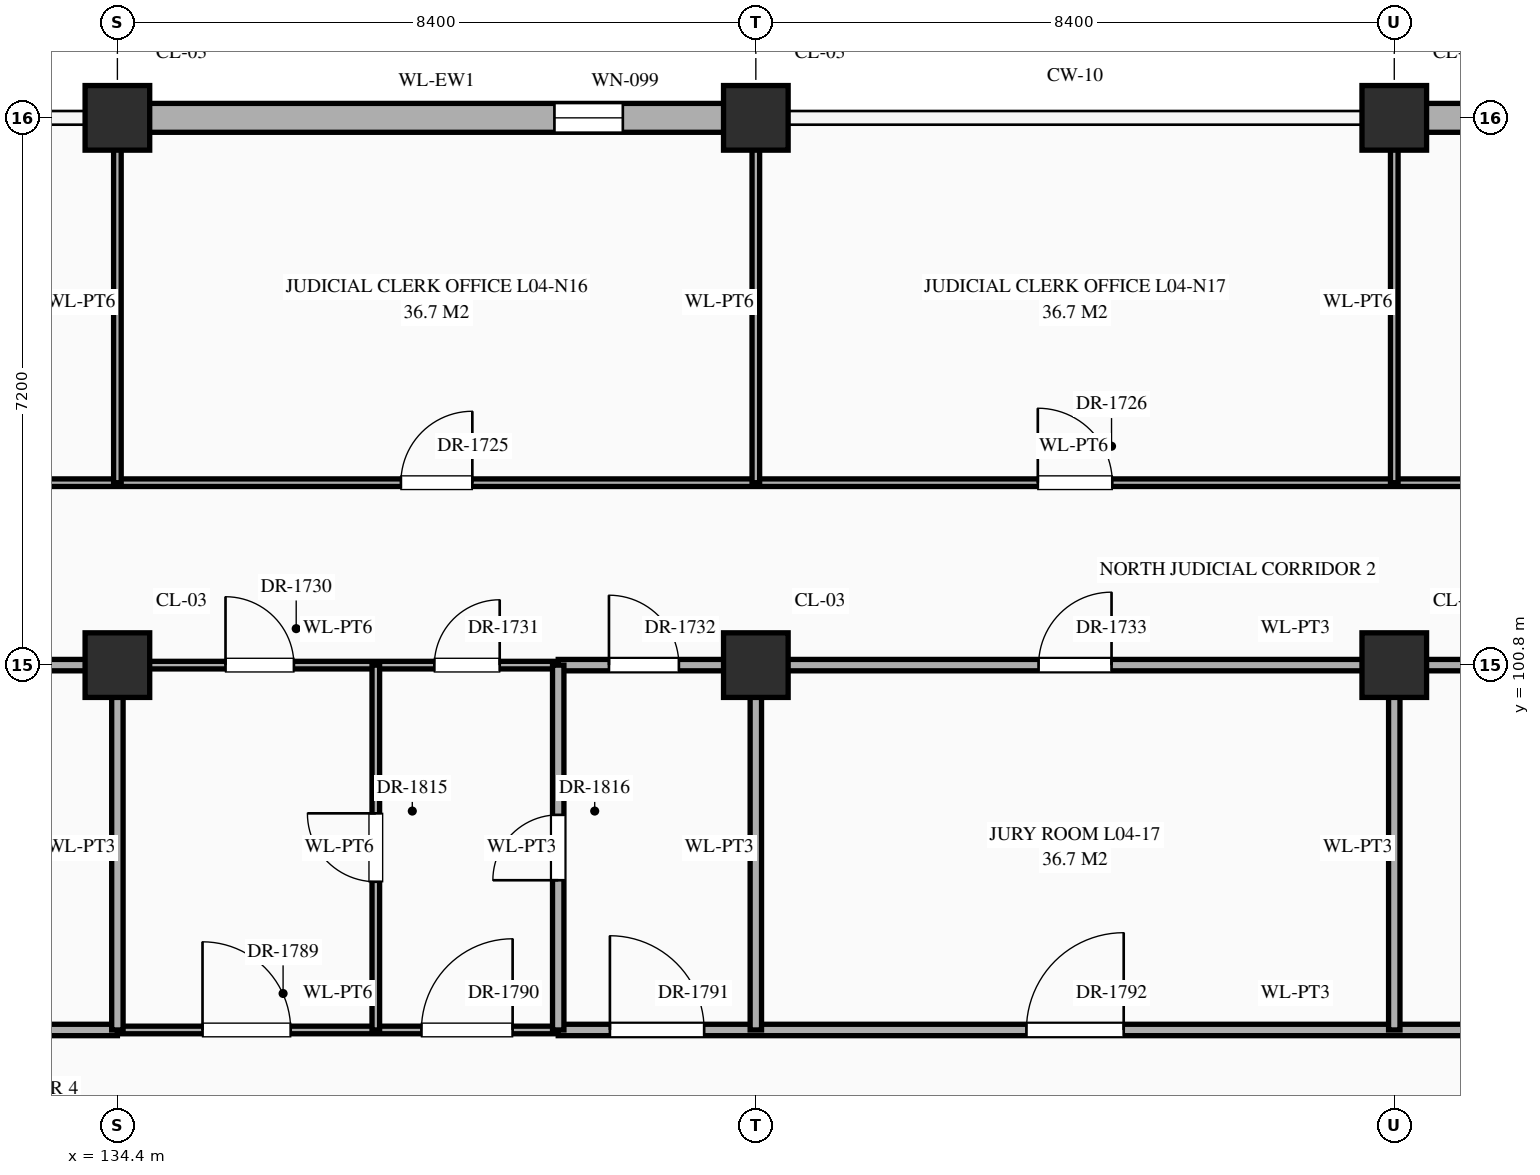
"""IFC4 building model, lengths in metres.
Left out: names, types, materials, properties, quantities, classifications, styles, units other than length and angle.
Written with IfcOpenShell. Run it as: python <this file> out.ifc"""

import sys

from ifc_helpers import new_model, si_unit, direction, frame, frame_2d, origin, origin_2d, place, context, subcontext, project, spatial, rectangle, extrude, element, fill, save


model = new_model("IFC4")
c1 = context("Model", 3, precision=1e-05, world=origin(), true_north=direction((0.0, 1.0)))
c2 = subcontext(c1, "Body", "Model", "MODEL_VIEW")
j1 = project(units=[si_unit("LENGTHUNIT", "METRE"), si_unit("PLANEANGLEUNIT", "RADIAN")], contexts=[c1])
p1 = place(None, origin())
s1 = spatial("IfcSite", under=j1, at=p1, CompositionType="ELEMENT")
p2 = place(p1, origin())
s2 = spatial("IfcBuilding", under=s1, at=p2, CompositionType="ELEMENT")
p3 = place(p2, frame((0.0, 0.0, 16.2)))
s3 = spatial("IfcBuildingStorey", under=s2, at=p3, CompositionType="ELEMENT", Elevation=16.2)
for number, where, z_axis, x_axis in (
    (1, (134.4, 100.8, 0.0), (0.0, 0.0, 1.0), (1.0, 0.0, 0.0)),
    (2, (134.4, 108.0, 0.0), (0.0, 0.0, 1.0), (1.0, 0.0, 0.0)),
    (3, (142.8, 100.8, 0.0), (0.0, 0.0, 1.0), (1.0, 0.0, 0.0)),
    (4, (142.8, 108.0, 0.0), (0.0, 0.0, 1.0), (1.0, 0.0, 0.0)),
    (5, (151.2, 100.8, 0.0), (0.0, 0.0, 1.0), (1.0, 0.0, 0.0)),
    (6, (151.2, 108.0, 0.0), (0.0, 0.0, 1.0), (1.0, 0.0, 0.0)),
):
    element("IfcColumn", number, at=place(p3, frame(where, z_axis=z_axis, x_axis=x_axis)), inside=s3, PredefinedType="COLUMN", context=c2, shape_type="SweptSolid", body=[
        extrude(rectangle(XDim=0.85, YDim=0.85, at=origin_2d()), origin(), (0.0, 0.0, 1.0), 5.4),
    ])
p4 = place(p3, frame((134.82, 108.0, 0.0), z_axis=(0.0, 0.0, 1.0), x_axis=(1.0, 0.0, 0.0)))
e7 = element("IfcWall", 7, at=p4, inside=s3, PredefinedType="STANDARD", context=c2, shape_type="SweptSolid", body=[
    extrude(rectangle(XDim=7.56, YDim=0.38, at=frame_2d((3.78, 0.0))), origin(), (0.0, 0.0, 1.0), 4.47),
])
p5 = place(p4, frame((5.33, 0.0, 0.85)))
e8 = element("IfcOpeningElement", 8, at=p5, cuts=e7, PredefinedType="OPENING", context=c2, shape_type="SweptSolid", body=[
    extrude(rectangle(XDim=0.9, YDim=1.2, at=frame_2d((0.45, 0.6))), frame((0.0, 0.202, 0.0), z_axis=(0.0, -1.0, 0.0), x_axis=(1.0, 0.0, 0.0)), (0.0, 0.0, 1.0), 0.404),
])
p6 = place(p3, frame((151.62, 108.0, 0.0), z_axis=(0.0, 0.0, 1.0), x_axis=(1.0, 0.0, 0.0)))
e9 = element("IfcWall", 9, at=p6, inside=s3, PredefinedType="STANDARD", context=c2, shape_type="SweptSolid", body=[
    extrude(rectangle(XDim=7.56, YDim=0.38, at=frame_2d((3.78, 0.0))), origin(), (0.0, 0.0, 1.0), 4.55),
])
p7 = place(p6, frame((5.33, 0.0, 0.85)))
e10 = element("IfcOpeningElement", 10, at=p7, cuts=e9, PredefinedType="OPENING", context=c2, shape_type="SweptSolid", body=[
    extrude(rectangle(XDim=0.9, YDim=1.56, at=frame_2d((0.45, 0.78))), frame((0.0, 0.202, 0.0), z_axis=(0.0, -1.0, 0.0), x_axis=(1.0, 0.0, 0.0)), (0.0, 0.0, 1.0), 0.404),
])
p8 = place(p3, frame((115.0, 96.0, 0.0), z_axis=(0.0, 0.0, 1.0), x_axis=(1.0, 0.0, 0.0)))
e11 = element("IfcWall", 11, at=p8, inside=s3, PredefinedType="STANDARD", context=c2, shape_type="SweptSolid", body=[
    extrude(rectangle(XDim=19.4, YDim=0.15, at=frame_2d((9.7, 0.0))), origin(), (0.0, 0.0, 1.0), 5.12),
])
p9 = place(p8, frame((0.73, 0.0, 0.0)))
e12 = element("IfcOpeningElement", 12, at=p9, cuts=e11, PredefinedType="OPENING", context=c2, shape_type="SweptSolid", body=[
    extrude(rectangle(XDim=1.14, YDim=2.4, at=frame_2d((0.57, 1.2))), frame((0.0, 0.087, 0.0), z_axis=(0.0, -1.0, 0.0), x_axis=(1.0, 0.0, 0.0)), (0.0, 0.0, 1.0), 0.174),
])
p10 = place(p8, frame((6.26, 0.0, 0.0)))
e13 = element("IfcOpeningElement", 13, at=p10, cuts=e11, PredefinedType="OPENING", context=c2, shape_type="SweptSolid", body=[
    extrude(rectangle(XDim=1.08, YDim=2.25, at=frame_2d((0.54, 1.125))), frame((0.0, 0.087, 0.0), z_axis=(0.0, -1.0, 0.0), x_axis=(1.0, 0.0, 0.0)), (0.0, 0.0, 1.0), 0.174),
])
p11 = place(p8, frame((14.64, 0.0, 0.0)))
e14 = element("IfcOpeningElement", 14, at=p11, cuts=e11, PredefinedType="OPENING", context=c2, shape_type="SweptSolid", body=[
    extrude(rectangle(XDim=1.12, YDim=2.25, at=frame_2d((0.56, 1.125))), frame((0.0, 0.087, 0.0), z_axis=(0.0, -1.0, 0.0), x_axis=(1.0, 0.0, 0.0)), (0.0, 0.0, 1.0), 0.174),
])
p12 = place(p3, frame((134.4, 96.0, 0.0), z_axis=(0.0, 0.0, 1.0), x_axis=(1.0, 0.0, 0.0)))
e15 = element("IfcWall", 15, at=p12, inside=s3, PredefinedType="STANDARD", context=c2, shape_type="SweptSolid", body=[
    extrude(rectangle(XDim=5.8, YDim=0.1, at=frame_2d((2.9, 0.0))), origin(), (0.0, 0.0, 1.0), 5.12),
])
p13 = place(p12, frame((1.12, 0.0, 0.0)))
e16 = element("IfcOpeningElement", 16, at=p13, cuts=e15, PredefinedType="OPENING", context=c2, shape_type="SweptSolid", body=[
    extrude(rectangle(XDim=1.16, YDim=2.3, at=frame_2d((0.58, 1.15))), frame((0.0, 0.062, 0.0), z_axis=(0.0, -1.0, 0.0), x_axis=(1.0, 0.0, 0.0)), (0.0, 0.0, 1.0), 0.124),
])
p14 = place(p12, frame((4.0, 0.0, 0.0)))
e17 = element("IfcOpeningElement", 17, at=p14, cuts=e15, PredefinedType="OPENING", context=c2, shape_type="SweptSolid", body=[
    extrude(rectangle(XDim=1.2, YDim=2.35, at=frame_2d((0.6, 1.175))), frame((0.0, 0.062, 0.0), z_axis=(0.0, -1.0, 0.0), x_axis=(1.0, 0.0, 0.0)), (0.0, 0.0, 1.0), 0.124),
])
p15 = place(p3, frame((140.2, 96.0, 0.0), z_axis=(0.0, 0.0, 1.0), x_axis=(1.0, 0.0, 0.0)))
e18 = element("IfcWall", 18, at=p15, inside=s3, PredefinedType="STANDARD", context=c2, shape_type="SweptSolid", body=[
    extrude(rectangle(XDim=19.4, YDim=0.15, at=frame_2d((9.7, 0.0))), origin(), (0.0, 0.0, 1.0), 5.05),
])
p16 = place(p15, frame((0.68, 0.0, 0.0)))
e19 = element("IfcOpeningElement", 19, at=p16, cuts=e18, PredefinedType="OPENING", context=c2, shape_type="SweptSolid", body=[
    extrude(rectangle(XDim=1.24, YDim=2.3, at=frame_2d((0.62, 1.15))), frame((0.0, 0.087, 0.0), z_axis=(0.0, -1.0, 0.0), x_axis=(1.0, 0.0, 0.0)), (0.0, 0.0, 1.0), 0.174),
])
p17 = place(p15, frame((6.16, 0.0, 0.0)))
e20 = element("IfcOpeningElement", 20, at=p17, cuts=e18, PredefinedType="OPENING", context=c2, shape_type="SweptSolid", body=[
    extrude(rectangle(XDim=1.28, YDim=2.35, at=frame_2d((0.64, 1.175))), frame((0.0, 0.087, 0.0), z_axis=(0.0, -1.0, 0.0), x_axis=(1.0, 0.0, 0.0)), (0.0, 0.0, 1.0), 0.174),
])
p18 = place(p15, frame((14.73, 0.0, 0.0)))
e21 = element("IfcOpeningElement", 21, at=p18, cuts=e18, PredefinedType="OPENING", context=c2, shape_type="SweptSolid", body=[
    extrude(rectangle(XDim=0.94, YDim=2.3, at=frame_2d((0.47, 1.15))), frame((0.0, 0.087, 0.0), z_axis=(0.0, -1.0, 0.0), x_axis=(1.0, 0.0, 0.0)), (0.0, 0.0, 1.0), 0.174),
])
p19 = place(p3, frame((126.0, 100.8, 0.0), z_axis=(0.0, 0.0, 1.0), x_axis=(1.0, 0.0, 0.0)))
e22 = element("IfcWall", 22, at=p19, inside=s3, PredefinedType="STANDARD", context=c2, shape_type="SweptSolid", body=[
    extrude(rectangle(XDim=8.4, YDim=0.15, at=frame_2d((4.2, 0.0))), origin(), (0.0, 0.0, 1.0), 4.27),
])
p20 = place(p19, frame((3.63, 0.0, 0.0)))
e23 = element("IfcOpeningElement", 23, at=p20, cuts=e22, PredefinedType="OPENING", context=c2, shape_type="SweptSolid", body=[
    extrude(rectangle(XDim=1.14, YDim=2.4, at=frame_2d((0.57, 1.2))), frame((0.0, 0.087, 0.0), z_axis=(0.0, -1.0, 0.0), x_axis=(1.0, 0.0, 0.0)), (0.0, 0.0, 1.0), 0.174),
])
p21 = place(p3, frame((134.4, 100.8, 0.0), z_axis=(0.0, 0.0, 1.0), x_axis=(1.0, 0.0, 0.0)))
e24 = element("IfcWall", 24, at=p21, inside=s3, PredefinedType="STANDARD", context=c2, shape_type="SweptSolid", body=[
    extrude(rectangle(XDim=5.8, YDim=0.1, at=frame_2d((2.9, 0.0))), origin(), (0.0, 0.0, 1.0), 4.27),
])
p22 = place(p21, frame((1.423, 0.0, 0.0)))
e25 = element("IfcOpeningElement", 25, at=p22, cuts=e24, PredefinedType="OPENING", context=c2, shape_type="SweptSolid", body=[
    extrude(rectangle(XDim=0.9, YDim=2.15, at=frame_2d((0.45, 1.075))), frame((0.0, 0.062, 0.0), z_axis=(0.0, -1.0, 0.0), x_axis=(1.0, 0.0, 0.0)), (0.0, 0.0, 1.0), 0.124),
])
p23 = place(p21, frame((4.17, 0.0, 0.0)))
e26 = element("IfcOpeningElement", 26, at=p23, cuts=e24, PredefinedType="OPENING", context=c2, shape_type="SweptSolid", body=[
    extrude(rectangle(XDim=0.86, YDim=2.1, at=frame_2d((0.43, 1.05))), frame((0.0, 0.062, 0.0), z_axis=(0.0, -1.0, 0.0), x_axis=(1.0, 0.0, 0.0)), (0.0, 0.0, 1.0), 0.124),
])
p24 = place(p3, frame((140.2, 100.8, 0.0), z_axis=(0.0, 0.0, 1.0), x_axis=(1.0, 0.0, 0.0)))
e27 = element("IfcWall", 27, at=p24, inside=s3, PredefinedType="STANDARD", context=c2, shape_type="SweptSolid", body=[
    extrude(rectangle(XDim=19.4, YDim=0.15, at=frame_2d((9.7, 0.0))), origin(), (0.0, 0.0, 1.0), 4.2),
])
p25 = place(p24, frame((0.667, 0.0, 0.0)))
e28 = element("IfcOpeningElement", 28, at=p25, cuts=e27, PredefinedType="OPENING", context=c2, shape_type="SweptSolid", body=[
    extrude(rectangle(XDim=0.92, YDim=2.15, at=frame_2d((0.46, 1.075))), frame((0.0, 0.087, 0.0), z_axis=(0.0, -1.0, 0.0), x_axis=(1.0, 0.0, 0.0)), (0.0, 0.0, 1.0), 0.174),
])
p26 = place(p24, frame((6.32, 0.0, 0.0)))
e29 = element("IfcOpeningElement", 29, at=p26, cuts=e27, PredefinedType="OPENING", context=c2, shape_type="SweptSolid", body=[
    extrude(rectangle(XDim=0.96, YDim=2.2, at=frame_2d((0.48, 1.1))), frame((0.0, 0.087, 0.0), z_axis=(0.0, -1.0, 0.0), x_axis=(1.0, 0.0, 0.0)), (0.0, 0.0, 1.0), 0.174),
])
p27 = place(p24, frame((14.7, 0.0, 0.0)))
e30 = element("IfcOpeningElement", 30, at=p27, cuts=e27, PredefinedType="OPENING", context=c2, shape_type="SweptSolid", body=[
    extrude(rectangle(XDim=1.0, YDim=2.25, at=frame_2d((0.5, 1.125))), frame((0.0, 0.087, 0.0), z_axis=(0.0, -1.0, 0.0), x_axis=(1.0, 0.0, 0.0)), (0.0, 0.0, 1.0), 0.174),
])
p28 = place(p3, frame((126.0, 103.2, 0.0), z_axis=(0.0, 0.0, 1.0), x_axis=(1.0, 0.0, 0.0)))
e31 = element("IfcWall", 31, at=p28, inside=s3, PredefinedType="STANDARD", context=c2, shape_type="SweptSolid", body=[
    extrude(rectangle(XDim=41.96, YDim=0.1, at=frame_2d((20.98, 0.0))), origin(), (0.0, 0.0, 1.0), 5.05),
])
p29 = place(p28, frame((3.56, 0.0, 0.0)))
e32 = element("IfcOpeningElement", 32, at=p29, cuts=e31, PredefinedType="OPENING", context=c2, shape_type="SweptSolid", body=[
    extrude(rectangle(XDim=1.28, YDim=2.35, at=frame_2d((0.64, 1.175))), frame((0.0, 0.062, 0.0), z_axis=(0.0, -1.0, 0.0), x_axis=(1.0, 0.0, 0.0)), (0.0, 0.0, 1.0), 0.124),
])
p30 = place(p28, frame((12.13, 0.0, 0.0)))
e33 = element("IfcOpeningElement", 33, at=p30, cuts=e31, PredefinedType="OPENING", context=c2, shape_type="SweptSolid", body=[
    extrude(rectangle(XDim=0.94, YDim=2.3, at=frame_2d((0.47, 1.15))), frame((0.0, 0.062, 0.0), z_axis=(0.0, -1.0, 0.0), x_axis=(1.0, 0.0, 0.0)), (0.0, 0.0, 1.0), 0.124),
])
p31 = place(p28, frame((20.51, 0.0, 0.0)))
e34 = element("IfcOpeningElement", 34, at=p31, cuts=e31, PredefinedType="OPENING", context=c2, shape_type="SweptSolid", body=[
    extrude(rectangle(XDim=0.98, YDim=2.35, at=frame_2d((0.49, 1.175))), frame((0.0, 0.062, 0.0), z_axis=(0.0, -1.0, 0.0), x_axis=(1.0, 0.0, 0.0)), (0.0, 0.0, 1.0), 0.124),
])
p32 = place(p28, frame((28.89, 0.0, 0.0)))
e35 = element("IfcOpeningElement", 35, at=p32, cuts=e31, PredefinedType="OPENING", context=c2, shape_type="SweptSolid", body=[
    extrude(rectangle(XDim=1.02, YDim=2.4, at=frame_2d((0.51, 1.2))), frame((0.0, 0.062, 0.0), z_axis=(0.0, -1.0, 0.0), x_axis=(1.0, 0.0, 0.0)), (0.0, 0.0, 1.0), 0.124),
])
p33 = place(p28, frame((37.25, 0.0, 0.0)))
e36 = element("IfcOpeningElement", 36, at=p33, cuts=e31, PredefinedType="OPENING", context=c2, shape_type="SweptSolid", body=[
    extrude(rectangle(XDim=1.06, YDim=2.4, at=frame_2d((0.53, 1.2))), frame((0.0, 0.062, 0.0), z_axis=(0.0, -1.0, 0.0), x_axis=(1.0, 0.0, 0.0)), (0.0, 0.0, 1.0), 0.124),
])
p34 = place(p3, frame((134.4, 96.0, 0.0), z_axis=(0.0, 0.0, 1.0), x_axis=(0.0, 1.0, 0.0)))
e37 = element("IfcWall", 37, at=p34, inside=s3, PredefinedType="STANDARD", context=c2, shape_type="SweptSolid", body=[
    extrude(rectangle(XDim=4.8, YDim=0.15, at=frame_2d((2.4, 0.0))), origin(), (0.0, 0.0, 1.0), 4.37),
])
p35 = place(p3, frame((134.4, 103.2, 0.0), z_axis=(0.0, 0.0, 1.0), x_axis=(0.0, 1.0, 0.0)))
e38 = element("IfcWall", 38, at=p35, inside=s3, PredefinedType="STANDARD", context=c2, shape_type="SweptSolid", body=[
    extrude(rectangle(XDim=4.76, YDim=0.1, at=frame_2d((2.38, 0.0))), origin(), (0.0, 0.0, 1.0), 4.37),
])
p36 = place(p3, frame((137.8, 96.0, 0.0), z_axis=(0.0, 0.0, 1.0), x_axis=(0.0, 1.0, 0.0)))
e39 = element("IfcWall", 39, at=p36, inside=s3, PredefinedType="STANDARD", context=c2, shape_type="SweptSolid", body=[
    extrude(rectangle(XDim=4.8, YDim=0.1, at=frame_2d((2.4, 0.0))), origin(), (0.0, 0.0, 1.0), 5.12),
])
p37 = place(p36, frame((1.95, 0.0, 0.0)))
e40 = element("IfcOpeningElement", 40, at=p37, cuts=e39, PredefinedType="OPENING", context=c2, shape_type="SweptSolid", body=[
    extrude(rectangle(XDim=0.9, YDim=2.15, at=frame_2d((0.45, 1.075))), frame((0.0, 0.062, 0.0), z_axis=(0.0, -1.0, 0.0), x_axis=(1.0, 0.0, 0.0)), (0.0, 0.0, 1.0), 0.124),
])
p38 = place(p3, frame((140.2, 96.0, 0.0), z_axis=(0.0, 0.0, 1.0), x_axis=(0.0, 1.0, 0.0)))
e41 = element("IfcWall", 41, at=p38, inside=s3, PredefinedType="STANDARD", context=c2, shape_type="SweptSolid", body=[
    extrude(rectangle(XDim=4.8, YDim=0.15, at=frame_2d((2.4, 0.0))), origin(), (0.0, 0.0, 1.0), 5.12),
])
p39 = place(p38, frame((1.97, 0.0, 0.0)))
e42 = element("IfcOpeningElement", 42, at=p39, cuts=e41, PredefinedType="OPENING", context=c2, shape_type="SweptSolid", body=[
    extrude(rectangle(XDim=0.86, YDim=2.1, at=frame_2d((0.43, 1.05))), frame((0.0, 0.087, 0.0), z_axis=(0.0, -1.0, 0.0), x_axis=(1.0, 0.0, 0.0)), (0.0, 0.0, 1.0), 0.174),
])
p40 = place(p3, frame((142.8, 96.0, 0.0), z_axis=(0.0, 0.0, 1.0), x_axis=(0.0, 1.0, 0.0)))
e43 = element("IfcWall", 43, at=p40, inside=s3, PredefinedType="STANDARD", context=c2, shape_type="SweptSolid", body=[
    extrude(rectangle(XDim=4.8, YDim=0.15, at=frame_2d((2.4, 0.0))), origin(), (0.0, 0.0, 1.0), 4.3),
])
p41 = place(p3, frame((142.8, 103.2, 0.0), z_axis=(0.0, 0.0, 1.0), x_axis=(0.0, 1.0, 0.0)))
e44 = element("IfcWall", 44, at=p41, inside=s3, PredefinedType="STANDARD", context=c2, shape_type="SweptSolid", body=[
    extrude(rectangle(XDim=4.76, YDim=0.1, at=frame_2d((2.38, 0.0))), origin(), (0.0, 0.0, 1.0), 4.3),
])
p42 = place(p3, frame((151.2, 96.0, 0.0), z_axis=(0.0, 0.0, 1.0), x_axis=(0.0, 1.0, 0.0)))
e45 = element("IfcWall", 45, at=p42, inside=s3, PredefinedType="STANDARD", context=c2, shape_type="SweptSolid", body=[
    extrude(rectangle(XDim=4.8, YDim=0.15, at=frame_2d((2.4, 0.0))), origin(), (0.0, 0.0, 1.0), 4.3),
])
p43 = place(p3, frame((151.2, 103.2, 0.0), z_axis=(0.0, 0.0, 1.0), x_axis=(0.0, 1.0, 0.0)))
e46 = element("IfcWall", 46, at=p43, inside=s3, PredefinedType="STANDARD", context=c2, shape_type="SweptSolid", body=[
    extrude(rectangle(XDim=4.76, YDim=0.1, at=frame_2d((2.38, 0.0))), origin(), (0.0, 0.0, 1.0), 4.3),
])
p44 = place(p5, origin())
e47 = element("IfcWindow", 47, at=p44, inside=s3, PartitioningType="SINGLE_PANEL", PredefinedType="WINDOW", context=c2, shape_type="SweptSolid", body=[
    extrude(rectangle(XDim=0.9, YDim=1.2, at=frame_2d((0.45, 0.6))), frame((0.0, 0.03, 0.0), z_axis=(0.0, -1.0, 0.0), x_axis=(1.0, 0.0, 0.0)), (0.0, 0.0, 1.0), 0.06),
])
fill(e8, e47)
p45 = place(p30, origin())
e48 = element("IfcDoor", 48, at=p45, inside=s3, OperationType="SINGLE_SWING_RIGHT", PredefinedType="DOOR", context=c2, shape_type="SweptSolid", body=[
    extrude(rectangle(XDim=0.94, YDim=2.3, at=frame_2d((0.47, 1.15))), frame((0.0, 0.025, 0.0), z_axis=(0.0, -1.0, 0.0), x_axis=(1.0, 0.0, 0.0)), (0.0, 0.0, 1.0), 0.05),
])
fill(e33, e48)
p46 = place(p31, origin())
e49 = element("IfcDoor", 49, at=p46, inside=s3, OperationType="SINGLE_SWING_LEFT", PredefinedType="DOOR", context=c2, shape_type="SweptSolid", body=[
    extrude(rectangle(XDim=0.98, YDim=2.35, at=frame_2d((0.49, 1.175))), frame((0.0, 0.025, 0.0), z_axis=(0.0, -1.0, 0.0), x_axis=(1.0, 0.0, 0.0)), (0.0, 0.0, 1.0), 0.05),
])
fill(e34, e49)
p47 = place(p22, origin())
e50 = element("IfcDoor", 50, at=p47, inside=s3, OperationType="SINGLE_SWING_LEFT", PredefinedType="DOOR", context=c2, shape_type="SweptSolid", body=[
    extrude(rectangle(XDim=0.9, YDim=2.15, at=frame_2d((0.45, 1.075))), frame((0.0, 0.025, 0.0), z_axis=(0.0, -1.0, 0.0), x_axis=(1.0, 0.0, 0.0)), (0.0, 0.0, 1.0), 0.05),
])
fill(e25, e50)
p48 = place(p23, origin())
e51 = element("IfcDoor", 51, at=p48, inside=s3, OperationType="SINGLE_SWING_RIGHT", PredefinedType="DOOR", context=c2, shape_type="SweptSolid", body=[
    extrude(rectangle(XDim=0.86, YDim=2.1, at=frame_2d((0.43, 1.05))), frame((0.0, 0.025, 0.0), z_axis=(0.0, -1.0, 0.0), x_axis=(1.0, 0.0, 0.0)), (0.0, 0.0, 1.0), 0.05),
])
fill(e26, e51)
p49 = place(p25, origin())
e52 = element("IfcDoor", 52, at=p49, inside=s3, OperationType="SINGLE_SWING_LEFT", PredefinedType="DOOR", context=c2, shape_type="SweptSolid", body=[
    extrude(rectangle(XDim=0.92, YDim=2.15, at=frame_2d((0.46, 1.075))), frame((0.0, 0.025, 0.0), z_axis=(0.0, -1.0, 0.0), x_axis=(1.0, 0.0, 0.0)), (0.0, 0.0, 1.0), 0.05),
])
fill(e28, e52)
p50 = place(p26, origin())
e53 = element("IfcDoor", 53, at=p50, inside=s3, OperationType="SINGLE_SWING_RIGHT", PredefinedType="DOOR", context=c2, shape_type="SweptSolid", body=[
    extrude(rectangle(XDim=0.96, YDim=2.2, at=frame_2d((0.48, 1.1))), frame((0.0, 0.025, 0.0), z_axis=(0.0, -1.0, 0.0), x_axis=(1.0, 0.0, 0.0)), (0.0, 0.0, 1.0), 0.05),
])
fill(e29, e53)
p51 = place(p13, origin())
e54 = element("IfcDoor", 54, at=p51, inside=s3, OperationType="SINGLE_SWING_LEFT", PredefinedType="DOOR", context=c2, shape_type="SweptSolid", body=[
    extrude(rectangle(XDim=1.16, YDim=2.3, at=frame_2d((0.58, 1.15))), frame((0.0, 0.025, 0.0), z_axis=(0.0, -1.0, 0.0), x_axis=(1.0, 0.0, 0.0)), (0.0, 0.0, 1.0), 0.05),
])
fill(e16, e54)
p52 = place(p14, origin())
e55 = element("IfcDoor", 55, at=p52, inside=s3, OperationType="SINGLE_SWING_RIGHT", PredefinedType="DOOR", context=c2, shape_type="SweptSolid", body=[
    extrude(rectangle(XDim=1.2, YDim=2.35, at=frame_2d((0.6, 1.175))), frame((0.0, 0.025, 0.0), z_axis=(0.0, -1.0, 0.0), x_axis=(1.0, 0.0, 0.0)), (0.0, 0.0, 1.0), 0.05),
])
fill(e17, e55)
p53 = place(p16, origin())
e56 = element("IfcDoor", 56, at=p53, inside=s3, OperationType="SINGLE_SWING_LEFT", PredefinedType="DOOR", context=c2, shape_type="SweptSolid", body=[
    extrude(rectangle(XDim=1.24, YDim=2.3, at=frame_2d((0.62, 1.15))), frame((0.0, 0.025, 0.0), z_axis=(0.0, -1.0, 0.0), x_axis=(1.0, 0.0, 0.0)), (0.0, 0.0, 1.0), 0.05),
])
fill(e19, e56)
p54 = place(p17, origin())
e57 = element("IfcDoor", 57, at=p54, inside=s3, OperationType="SINGLE_SWING_RIGHT", PredefinedType="DOOR", context=c2, shape_type="SweptSolid", body=[
    extrude(rectangle(XDim=1.28, YDim=2.35, at=frame_2d((0.64, 1.175))), frame((0.0, 0.025, 0.0), z_axis=(0.0, -1.0, 0.0), x_axis=(1.0, 0.0, 0.0)), (0.0, 0.0, 1.0), 0.05),
])
fill(e20, e57)
p55 = place(p37, origin())
e58 = element("IfcDoor", 58, at=p55, inside=s3, OperationType="SINGLE_SWING_RIGHT", PredefinedType="DOOR", context=c2, shape_type="SweptSolid", body=[
    extrude(rectangle(XDim=0.9, YDim=2.15, at=frame_2d((0.45, 1.075))), frame((0.0, 0.025, 0.0), z_axis=(0.0, -1.0, 0.0), x_axis=(1.0, 0.0, 0.0)), (0.0, 0.0, 1.0), 0.05),
])
fill(e40, e58)
p56 = place(p39, origin())
e59 = element("IfcDoor", 59, at=p56, inside=s3, OperationType="SINGLE_SWING_LEFT", PredefinedType="DOOR", context=c2, shape_type="SweptSolid", body=[
    extrude(rectangle(XDim=0.86, YDim=2.1, at=frame_2d((0.43, 1.05))), frame((0.0, 0.025, 0.0), z_axis=(0.0, -1.0, 0.0), x_axis=(1.0, 0.0, 0.0)), (0.0, 0.0, 1.0), 0.05),
])
fill(e42, e59)
save(model, sys.argv[1])
